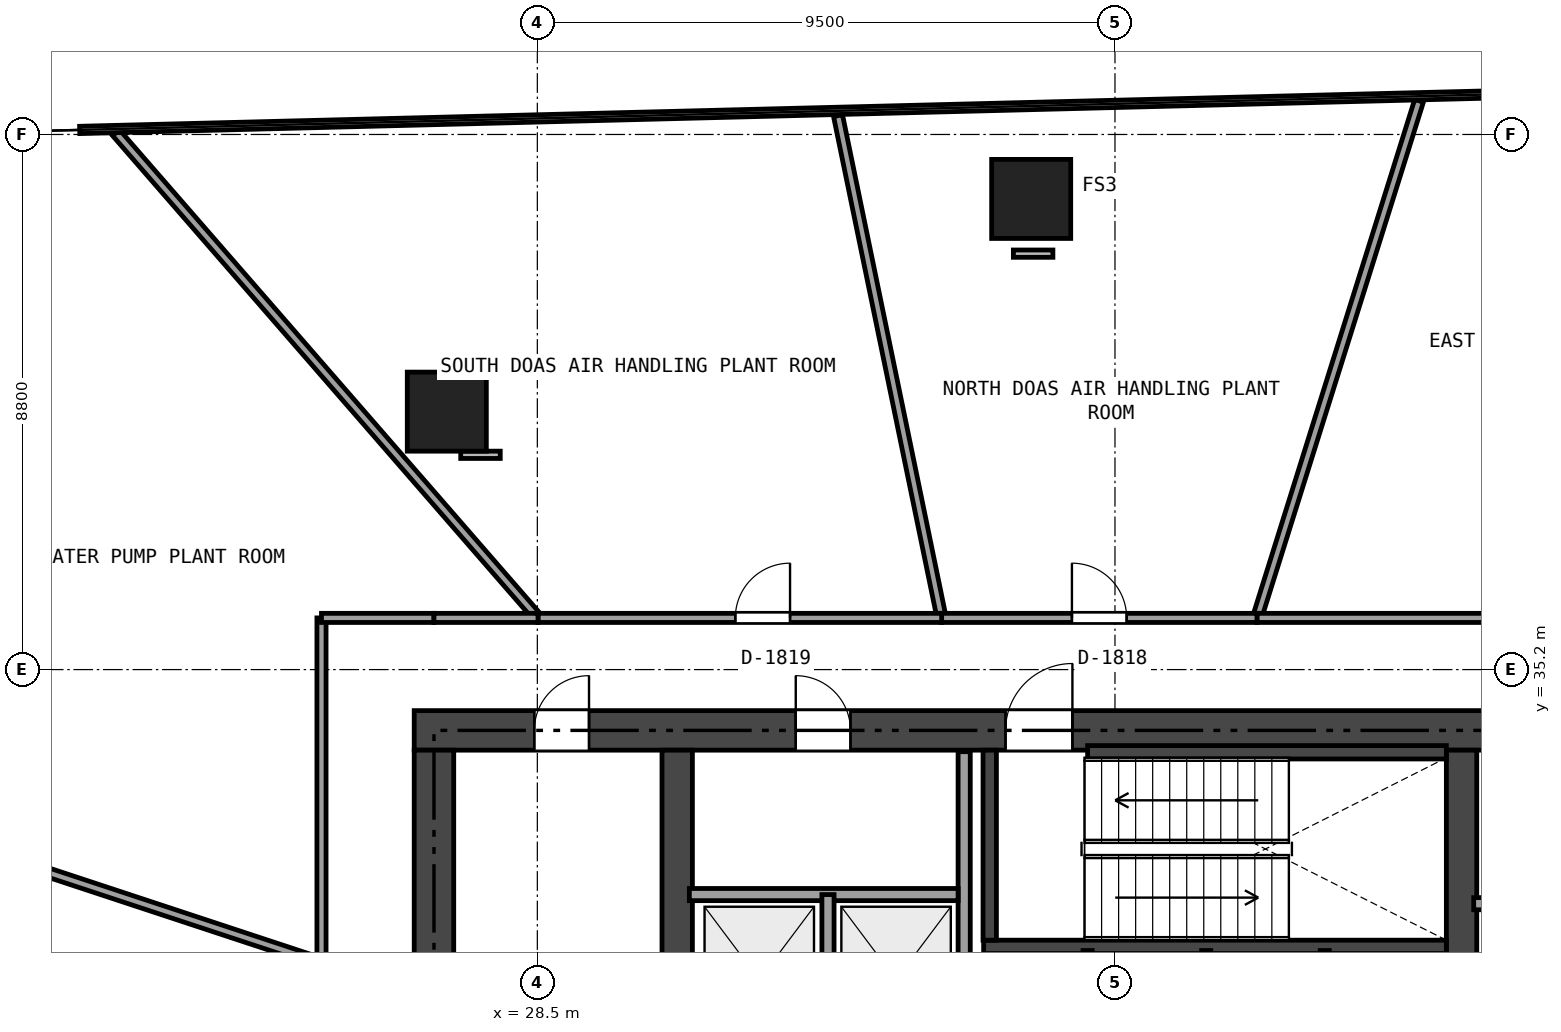
"""IFC4 building model, lengths in metres.
Left out: names, types, materials, properties, quantities, classifications, styles, units other than length and angle.
Written with IfcOpenShell. Run it as: python <this file> out.ifc"""

import sys

from ifc_helpers import new_model, si_unit, direction, frame, frame_2d, origin, origin_2d, place, context, subcontext, project, spatial, rectangle, extrude, element, fill, save


model = new_model("IFC4")
c1 = context("Model", 3, precision=1e-05, world=origin(), true_north=direction((0.0, 1.0)))
c2 = subcontext(c1, "Body", "Model", "MODEL_VIEW")
j1 = project(units=[si_unit("LENGTHUNIT", "METRE"), si_unit("PLANEANGLEUNIT", "RADIAN")], contexts=[c1])
p1 = place(None, origin())
s1 = spatial("IfcSite", under=j1, at=p1, CompositionType="ELEMENT")
p2 = place(p1, origin())
s2 = spatial("IfcBuilding", under=s1, at=p2, CompositionType="ELEMENT")
p3 = place(p2, frame((0.0, 0.0, 71.85)))
s3 = spatial("IfcBuildingStorey", under=s2, at=p3, CompositionType="ELEMENT", Elevation=71.85)
p4 = place(p3, frame((26.475, 34.2, 0.0), z_axis=(0.0, 0.0, 1.0), x_axis=(1.0, 0.0, 0.0)))
e1 = element("IfcWall", 1, at=p4, inside=s3, PredefinedType="SHEAR", context=c2, shape_type="SweptSolid", body=[
    extrude(rectangle(XDim=21.45, YDim=0.65, at=frame_2d((10.725, 0.0))), origin(), (0.0, 0.0, 1.0), 4.08),
])
p5 = place(p4, frame((9.725, 0.0, 0.0)))
e2 = element("IfcOpeningElement", 2, at=p5, cuts=e1, PredefinedType="OPENING", context=c2, shape_type="SweptSolid", body=[
    extrude(rectangle(XDim=1.1, YDim=2.15, at=frame_2d((0.55, 1.075))), frame((0.0, 0.335, 0.0), z_axis=(0.0, -1.0, 0.0), x_axis=(1.0, 0.0, 0.0)), (0.0, 0.0, 1.0), 0.67),
])
p6 = place(p4, frame((1.975, 0.0, 0.0)))
e3 = element("IfcOpeningElement", 3, at=p6, cuts=e1, PredefinedType="OPENING", context=c2, shape_type="SweptSolid", body=[
    extrude(rectangle(XDim=0.9, YDim=2.1, at=frame_2d((0.45, 1.05))), frame((0.0, 0.335, 0.0), z_axis=(0.0, -1.0, 0.0), x_axis=(1.0, 0.0, 0.0)), (0.0, 0.0, 1.0), 0.67),
])
p7 = place(p4, frame((6.275, 0.0, 0.0)))
e4 = element("IfcOpeningElement", 4, at=p7, cuts=e1, PredefinedType="OPENING", context=c2, shape_type="SweptSolid", body=[
    extrude(rectangle(XDim=0.9, YDim=2.1, at=frame_2d((0.45, 1.05))), frame((0.0, 0.335, 0.0), z_axis=(0.0, -1.0, 0.0), x_axis=(1.0, 0.0, 0.0)), (0.0, 0.0, 1.0), 0.67),
])
p8 = place(p3, frame((26.8, 18.925, 0.0), z_axis=(0.0, 0.0, 1.0), x_axis=(0.0, 1.0, 0.0)))
e5 = element("IfcWall", 5, at=p8, inside=s3, PredefinedType="SHEAR", context=c2, shape_type="SweptSolid", body=[
    extrude(rectangle(XDim=14.95, YDim=0.65, at=frame_2d((7.475, 0.0))), origin(), (0.0, 0.0, 1.0), 4.08),
])
p9 = place(p8, frame((4.6, 0.0, 0.02)))
e6 = element("IfcOpeningElement", 6, at=p9, cuts=e5, PredefinedType="OPENING", context=c2, shape_type="SweptSolid", body=[
    extrude(rectangle(XDim=0.9, YDim=2.02, at=frame_2d((0.45, 1.01))), frame((0.0, 0.335, 0.0), z_axis=(0.0, -1.0, 0.0), x_axis=(1.0, 0.0, 0.0)), (0.0, 0.0, 1.0), 0.67),
])
p10 = place(p3, frame((30.8, 18.925, 0.0), z_axis=(0.0, 0.0, 1.0), x_axis=(0.0, 1.0, 0.0)))
e7 = element("IfcWall", 7, at=p10, inside=s3, PredefinedType="SHEAR", context=c2, shape_type="SweptSolid", body=[
    extrude(rectangle(XDim=14.95, YDim=0.5, at=frame_2d((7.475, 0.0))), origin(), (0.0, 0.0, 1.0), 4.08),
])
p11 = place(p10, frame((6.575, 0.0, 0.0)))
e8 = element("IfcOpeningElement", 8, at=p11, cuts=e7, PredefinedType="OPENING", context=c2, shape_type="SweptSolid", body=[
    extrude(rectangle(XDim=1.1, YDim=2.15, at=frame_2d((0.55, 1.075))), frame((0.0, 0.26, 0.0), z_axis=(0.0, -1.0, 0.0), x_axis=(1.0, 0.0, 0.0)), (0.0, 0.0, 1.0), 0.52),
])
p12 = place(p10, frame((8.375, 0.0, 0.0)))
e9 = element("IfcOpeningElement", 9, at=p12, cuts=e7, PredefinedType="OPENING", context=c2, shape_type="SweptSolid", body=[
    extrude(rectangle(XDim=0.9, YDim=2.1, at=frame_2d((0.45, 1.05))), frame((0.0, 0.26, 0.0), z_axis=(0.0, -1.0, 0.0), x_axis=(1.0, 0.0, 0.0)), (0.0, 0.0, 1.0), 0.52),
])
p13 = place(p3, frame((43.7, 18.925, 0.0), z_axis=(0.0, 0.0, 1.0), x_axis=(0.0, 1.0, 0.0)))
e10 = element("IfcWall", 10, at=p13, inside=s3, PredefinedType="SHEAR", context=c2, shape_type="SweptSolid", body=[
    extrude(rectangle(XDim=14.95, YDim=0.5, at=frame_2d((7.475, 0.0))), origin(), (0.0, 0.0, 1.0), 4.08),
])
p14 = place(p13, frame((8.075, 0.0, 0.0)))
e11 = element("IfcOpeningElement", 11, at=p14, cuts=e10, PredefinedType="OPENING", context=c2, shape_type="SweptSolid", body=[
    extrude(rectangle(XDim=0.9, YDim=2.1, at=frame_2d((0.45, 1.05))), frame((0.0, 0.26, 0.0), z_axis=(0.0, -1.0, 0.0), x_axis=(1.0, 0.0, 0.0)), (0.0, 0.0, 1.0), 0.52),
])
p15 = place(p3, frame((35.84, 30.64, 0.0), z_axis=(0.0, 0.0, 1.0), x_axis=(1.0, 0.0, 0.0)))
e12 = element("IfcWall", 12, at=p15, inside=s3, PredefinedType="SHEAR", context=c2, shape_type="SweptSolid", body=[
    extrude(rectangle(XDim=7.61, YDim=0.22, at=frame_2d((3.805, 0.0))), origin(), (0.0, 0.0, 1.0), 4.08),
])
p16 = place(p3, frame((35.94, 30.75, 0.0), z_axis=(0.0, 0.0, 1.0), x_axis=(0.0, 1.0, 0.0)))
e13 = element("IfcWall", 13, at=p16, inside=s3, PredefinedType="SHEAR", context=c2, shape_type="SweptSolid", body=[
    extrude(rectangle(XDim=3.125, YDim=0.22, at=frame_2d((1.562, 0.0))), origin(), (0.0, 0.0, 1.0), 4.08),
])
p17 = place(p3, frame((37.55, 33.84, 0.0), z_axis=(0.0, 0.0, 1.0), x_axis=(1.0, 0.0, 0.0)))
e14 = element("IfcWall", 14, at=p17, inside=s3, PredefinedType="SHEAR", context=c2, shape_type="SweptSolid", body=[
    extrude(rectangle(XDim=5.9, YDim=0.22, at=frame_2d((2.95, 0.0))), origin(), (0.0, 0.0, 1.0), 4.08),
])
for number, where, z_axis, x_axis in (
    (15, (36.622, 42.94, 0.0), (0.0, 0.0, 1.0), (1.0, 0.0, 0.0)),
    (16, (27.011, 39.442, 0.0), (0.0, 0.0, 1.0), (1.0, 0.0, 0.0)),
):
    element("IfcColumn", number, at=place(p3, frame(where, z_axis=z_axis, x_axis=x_axis)), inside=s3, PredefinedType="COLUMN", context=c2, shape_type="SweptSolid", body=[
        extrude(rectangle(XDim=1.3, YDim=1.3, at=origin_2d()), origin(), (0.0, 0.0, 1.0), 4.08),
    ])
p18 = place(p3, frame((43.9, 31.35, 0.0), z_axis=(0.0, 0.0, 1.0), x_axis=(1.0, 0.0, 0.0)))
e17 = element("IfcWall", 17, at=p18, inside=s3, PredefinedType="SOLIDWALL", context=c2, shape_type="SweptSolid", body=[
    extrude(rectangle(XDim=3.35, YDim=0.2, at=frame_2d((1.675, 0.0))), origin(), (0.0, 0.0, 1.0), 4.08),
])
p19 = place(p3, frame((35.52, 18.95, 0.0), z_axis=(0.0, 0.0, 1.0), x_axis=(0.0, 1.0, 0.0)))
e18 = element("IfcWall", 18, at=p19, inside=s3, PredefinedType="SOLIDWALL", context=c2, shape_type="SweptSolid", body=[
    extrude(rectangle(XDim=14.9, YDim=0.2, at=frame_2d((7.45, 0.0))), origin(), (0.0, 0.0, 1.0), 3.601),
])
p20 = place(p19, frame((7.755, 0.0, 0.0)))
e19 = element("IfcOpeningElement", 19, at=p20, cuts=e18, PredefinedType="OPENING", context=c2, shape_type="SweptSolid", body=[
    extrude(rectangle(XDim=0.95, YDim=2.15, at=frame_2d((0.475, 1.075))), frame((0.0, 0.11, 0.0), z_axis=(0.0, -1.0, 0.0), x_axis=(1.0, 0.0, 0.0)), (0.0, 0.0, 1.0), 0.22),
])
p21 = place(p19, frame((0.6, 0.0, 0.0)))
e20 = element("IfcOpeningElement", 20, at=p21, cuts=e18, PredefinedType="OPENING", context=c2, shape_type="SweptSolid", body=[
    extrude(rectangle(XDim=0.9, YDim=2.1, at=frame_2d((0.45, 1.05))), frame((0.0, 0.11, 0.0), z_axis=(0.0, -1.0, 0.0), x_axis=(1.0, 0.0, 0.0)), (0.0, 0.0, 1.0), 0.22),
])
p22 = place(p3, frame((31.0, 31.5, 0.0), z_axis=(0.0, 0.0, 1.0), x_axis=(1.0, 0.0, 0.0)))
e21 = element("IfcWall", 21, at=p22, inside=s3, PredefinedType="SOLIDWALL", context=c2, shape_type="SweptSolid", body=[
    extrude(rectangle(XDim=4.42, YDim=0.2, at=frame_2d((2.21, 0.0))), origin(), (0.0, 0.0, 1.0), 4.08),
])
p23 = place(p3, frame((33.28, 28.68, 0.0), z_axis=(0.0, 0.0, 1.0), x_axis=(0.0, 1.0, 0.0)))
e22 = element("IfcWall", 22, at=p23, inside=s3, PredefinedType="SOLIDWALL", context=c2, shape_type="SweptSolid", body=[
    extrude(rectangle(XDim=2.82, YDim=0.2, at=frame_2d((1.41, 0.0))), origin(), (0.0, 0.0, 1.0), 4.08),
])
for number, where, z_axis, x_axis in (
    (23, (37.55, 28.15, 0.0), (0.0, 0.0, 1.0), (0.0, 1.0, 0.0)),
    (24, (39.5, 28.15, 0.0), (0.0, 0.0, 1.0), (0.0, 1.0, 0.0)),
    (25, (41.45, 28.15, 0.0), (0.0, 0.0, 1.0), (0.0, 1.0, 0.0)),
):
    element("IfcWall", number, at=place(p3, frame(where, z_axis=z_axis, x_axis=x_axis)), inside=s3, PredefinedType="PARTITIONING", context=c2, shape_type="SweptSolid", body=[
        extrude(rectangle(XDim=2.43, YDim=0.15, at=frame_2d((1.215, 0.0))), origin(), (0.0, 0.0, 1.0), 4.08),
    ])
p24 = place(p3, frame((43.001, 44.554, 0.0), z_axis=(0.0, 0.0, 1.0), x_axis=(-0.299148373838, -0.954206607832, 0.0)))
e26 = element("IfcWall", 26, at=p24, inside=s3, PredefinedType="PARTITIONING", context=c2, shape_type="SweptSolid", body=[
    extrude(rectangle(XDim=8.912, YDim=0.15, at=frame_2d((4.456, 0.0))), origin(), (0.0, 0.0, 1.0), 3.265),
])
p25 = place(p3, frame((40.335, 36.05, 0.0), z_axis=(0.0, 0.0, 1.0), x_axis=(1.0, 0.0, 0.0)))
e27 = element("IfcWall", 27, at=p25, inside=s3, PredefinedType="PARTITIONING", context=c2, shape_type="SweptSolid", body=[
    extrude(rectangle(XDim=7.582, YDim=0.15, at=frame_2d((3.791, 0.0))), origin(), (0.0, 0.0, 1.0), 3.065),
])
p26 = place(p25, frame((5.999, 0.0, 0.0)))
e28 = element("IfcOpeningElement", 28, at=p26, cuts=e27, PredefinedType="OPENING", context=c2, shape_type="SweptSolid", body=[
    extrude(rectangle(XDim=0.9, YDim=2.0, at=frame_2d((0.45, 1.0))), frame((0.0, 0.085, 0.0), z_axis=(0.0, -1.0, 0.0), x_axis=(1.0, 0.0, 0.0)), (0.0, 0.0, 1.0), 0.17),
])
p27 = place(p3, frame((33.445, 44.31, 0.0), z_axis=(0.0, 0.0, 1.0), x_axis=(0.202024539088, -0.97938046009, 0.0)))
e29 = element("IfcWall", 29, at=p27, inside=s3, PredefinedType="PARTITIONING", context=c2, shape_type="SweptSolid", body=[
    extrude(rectangle(XDim=8.434, YDim=0.15, at=frame_2d((4.217, 0.0))), origin(), (0.0, 0.0, 1.0), 3.265),
])
p28 = place(p3, frame((35.149, 36.05, 0.0), z_axis=(0.0, 0.0, 1.0), x_axis=(1.0, 0.0, 0.0)))
e30 = element("IfcWall", 30, at=p28, inside=s3, PredefinedType="PARTITIONING", context=c2, shape_type="SweptSolid", body=[
    extrude(rectangle(XDim=5.186, YDim=0.15, at=frame_2d((2.593, 0.0))), origin(), (0.0, 0.0, 1.0), 3.065),
])
p29 = place(p28, frame((2.143, 0.0, 0.0)))
e31 = element("IfcOpeningElement", 31, at=p29, cuts=e30, PredefinedType="OPENING", context=c2, shape_type="SweptSolid", body=[
    extrude(rectangle(XDim=0.9, YDim=2.0, at=frame_2d((0.45, 1.0))), frame((0.0, 0.085, 0.0), z_axis=(0.0, -1.0, 0.0), x_axis=(1.0, 0.0, 0.0)), (0.0, 0.0, 1.0), 0.17),
])
p30 = place(p3, frame((21.571, 44.029, 0.0), z_axis=(0.0, 0.0, 1.0), x_axis=(0.656269020125, -0.754526986412, 0.0)))
e32 = element("IfcWall", 32, at=p30, inside=s3, PredefinedType="PARTITIONING", context=c2, shape_type="SweptSolid", body=[
    extrude(rectangle(XDim=10.575, YDim=0.15, at=frame_2d((5.288, 0.0))), origin(), (0.0, 0.0, 1.0), 3.265),
])
p31 = place(p3, frame((28.511, 36.05, 0.0), z_axis=(0.0, 0.0, 1.0), x_axis=(1.0, 0.0, 0.0)))
e33 = element("IfcWall", 33, at=p31, inside=s3, PredefinedType="PARTITIONING", context=c2, shape_type="SweptSolid", body=[
    extrude(rectangle(XDim=6.638, YDim=0.15, at=frame_2d((3.319, 0.0))), origin(), (0.0, 0.0, 1.0), 3.065),
])
p32 = place(p31, frame((3.245, 0.0, 0.0)))
e34 = element("IfcOpeningElement", 34, at=p32, cuts=e33, PredefinedType="OPENING", context=c2, shape_type="SweptSolid", body=[
    extrude(rectangle(XDim=0.9, YDim=2.0, at=frame_2d((0.45, 1.0))), frame((0.0, 0.085, 0.0), z_axis=(0.0, -1.0, 0.0), x_axis=(1.0, 0.0, 0.0)), (0.0, 0.0, 1.0), 0.17),
])
p33 = place(p3, frame((14.18, 33.933, 0.0), z_axis=(0.0, 0.0, 1.0), x_axis=(0.949651837429, -0.313307177811, 0.0)))
e35 = element("IfcWall", 35, at=p33, inside=s3, PredefinedType="PARTITIONING", context=c2, shape_type="SweptSolid", body=[
    extrude(rectangle(XDim=11.341, YDim=0.15, at=frame_2d((5.67, 0.0))), origin(), (0.0, 0.0, 1.0), 3.265),
])
p34 = place(p33, frame((5.22, 0.0, 0.0)))
e36 = element("IfcOpeningElement", 36, at=p34, cuts=e35, PredefinedType="OPENING", context=c2, shape_type="SweptSolid", body=[
    extrude(rectangle(XDim=0.9, YDim=2.0, at=frame_2d((0.45, 1.0))), frame((0.0, 0.085, 0.0), z_axis=(0.0, -1.0, 0.0), x_axis=(1.0, 0.0, 0.0)), (0.0, 0.0, 1.0), 0.17),
])
p35 = place(p3, frame((24.95, 30.38, 0.0), z_axis=(0.0, 0.0, 1.0), x_axis=(0.0, 1.0, 0.0)))
e37 = element("IfcWall", 37, at=p35, inside=s3, PredefinedType="PARTITIONING", context=c2, shape_type="SweptSolid", body=[
    extrude(rectangle(XDim=5.67, YDim=0.15, at=frame_2d((2.835, 0.0))), origin(), (0.0, 0.0, 1.0), 3.265),
])
p36 = place(p3, frame((24.95, 36.05, 0.0), z_axis=(0.0, 0.0, 1.0), x_axis=(1.0, 0.0, 0.0)))
e38 = element("IfcWall", 38, at=p36, inside=s3, PredefinedType="PARTITIONING", context=c2, shape_type="SweptSolid", body=[
    extrude(rectangle(XDim=1.85, YDim=0.15, at=frame_2d((0.925, 0.0))), origin(), (0.0, 0.0, 1.0), 3.265),
])
p37 = place(p3, frame((26.8, 36.05, 0.0), z_axis=(0.0, 0.0, 1.0), x_axis=(1.0, 0.0, 0.0)))
e39 = element("IfcWall", 39, at=p37, inside=s3, PredefinedType="PARTITIONING", context=c2, shape_type="SweptSolid", body=[
    extrude(rectangle(XDim=1.711, YDim=0.15, at=frame_2d((0.855, 0.0))), origin(), (0.0, 0.0, 1.0), 4.08),
])
p38 = place(p5, origin())
e40 = element("IfcDoor", 40, at=p38, inside=s3, OperationType="SINGLE_SWING_RIGHT", PredefinedType="DOOR", context=c2, shape_type="SweptSolid", body=[
    extrude(rectangle(XDim=1.1, YDim=2.15, at=frame_2d((0.55, 1.075))), frame((0.0, 0.025, 0.0), z_axis=(0.0, -1.0, 0.0), x_axis=(1.0, 0.0, 0.0)), (0.0, 0.0, 1.0), 0.05),
])
fill(e2, e40)
p39 = place(p6, origin())
e41 = element("IfcDoor", 41, at=p39, inside=s3, OperationType="SINGLE_SWING_RIGHT", PredefinedType="DOOR", context=c2, shape_type="SweptSolid", body=[
    extrude(rectangle(XDim=0.9, YDim=2.1, at=frame_2d((0.45, 1.05))), frame((0.0, 0.025, 0.0), z_axis=(0.0, -1.0, 0.0), x_axis=(1.0, 0.0, 0.0)), (0.0, 0.0, 1.0), 0.05),
])
fill(e3, e41)
p40 = place(p7, origin())
e42 = element("IfcDoor", 42, at=p40, inside=s3, OperationType="SINGLE_SWING_LEFT", PredefinedType="DOOR", context=c2, shape_type="SweptSolid", body=[
    extrude(rectangle(XDim=0.9, YDim=2.1, at=frame_2d((0.45, 1.05))), frame((0.0, 0.025, 0.0), z_axis=(0.0, -1.0, 0.0), x_axis=(1.0, 0.0, 0.0)), (0.0, 0.0, 1.0), 0.05),
])
fill(e4, e42)
p41 = place(p29, origin())
e43 = element("IfcDoor", 43, at=p41, inside=s3, OperationType="SINGLE_SWING_LEFT", PredefinedType="DOOR", context=c2, shape_type="SweptSolid", body=[
    extrude(rectangle(XDim=0.9, YDim=2.0, at=frame_2d((0.45, 1.0))), frame((0.0, 0.025, 0.0), z_axis=(0.0, -1.0, 0.0), x_axis=(1.0, 0.0, 0.0)), (0.0, 0.0, 1.0), 0.05),
])
fill(e31, e43)
p42 = place(p32, origin())
e44 = element("IfcDoor", 44, at=p42, inside=s3, OperationType="SINGLE_SWING_RIGHT", PredefinedType="DOOR", context=c2, shape_type="SweptSolid", body=[
    extrude(rectangle(XDim=0.9, YDim=2.0, at=frame_2d((0.45, 1.0))), frame((0.0, 0.025, 0.0), z_axis=(0.0, -1.0, 0.0), x_axis=(1.0, 0.0, 0.0)), (0.0, 0.0, 1.0), 0.05),
])
fill(e34, e44)
save(model, sys.argv[1])
